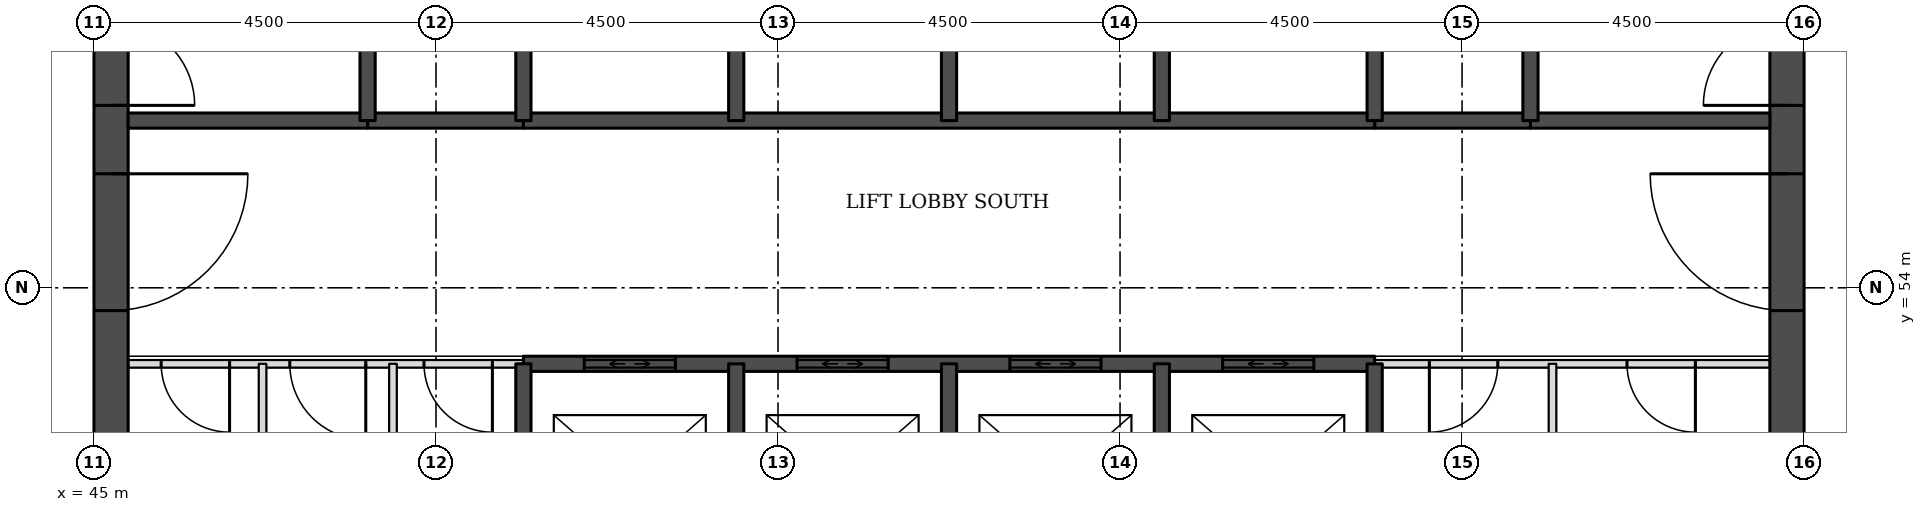
"""IFC4 building model, lengths in metres.
Left out: names, types, materials, properties, quantities, classifications, styles, units other than length and angle.
Written with IfcOpenShell. Run it as: python <this file> out.ifc"""

import sys

from ifc_helpers import new_model, si_unit, direction, frame, frame_2d, origin, place, context, subcontext, project, spatial, rectangle, extrude, element, fill, save


model = new_model("IFC4")
c1 = context("Model", 3, precision=1e-05, world=origin(), true_north=direction((0.0, 1.0)))
c2 = subcontext(c1, "Body", "Model", "MODEL_VIEW")
j1 = project(units=[si_unit("LENGTHUNIT", "METRE"), si_unit("PLANEANGLEUNIT", "RADIAN")], contexts=[c1])
p1 = place(None, origin())
s1 = spatial("IfcSite", under=j1, at=p1, CompositionType="ELEMENT")
p2 = place(p1, origin())
s2 = spatial("IfcBuilding", under=s1, at=p2, CompositionType="ELEMENT")
p3 = place(p2, frame((0.0, 0.0, 127.0)))
s3 = spatial("IfcBuildingStorey", under=s2, at=p3, CompositionType="ELEMENT", Elevation=127.0)
p4 = place(p3, frame((45.225, 49.5, 0.0), z_axis=(0.0, 0.0, 1.0), x_axis=(0.0, 1.0, 0.0)))
e1 = element("IfcWall", 1, at=p4, inside=s3, PredefinedType="SHEAR", context=c2, shape_type="SweptSolid", body=[
    extrude(rectangle(XDim=22.5, YDim=0.45, at=frame_2d((11.25, 0.0))), origin(), (0.0, 0.0, 1.0), 3.7),
])
p5 = place(p4, frame((4.2, 0.0, 0.0)))
e2 = element("IfcOpeningElement", 2, at=p5, cuts=e1, PredefinedType="OPENING", context=c2, shape_type="SweptSolid", body=[
    extrude(rectangle(XDim=1.8, YDim=2.1, at=frame_2d((0.9, 1.05))), frame((0.0, 0.235, 0.0), z_axis=(0.0, -1.0, 0.0), x_axis=(1.0, 0.0, 0.0)), (0.0, 0.0, 1.0), 0.47),
])
p6 = place(p4, frame((6.9, 0.0, 0.0)))
e3 = element("IfcOpeningElement", 3, at=p6, cuts=e1, PredefinedType="OPENING", context=c2, shape_type="SweptSolid", body=[
    extrude(rectangle(XDim=1.1, YDim=2.1, at=frame_2d((0.55, 1.05))), frame((0.0, 0.235, 0.0), z_axis=(0.0, -1.0, 0.0), x_axis=(1.0, 0.0, 0.0)), (0.0, 0.0, 1.0), 0.47),
])
p7 = place(p4, frame((13.6, 0.0, 0.0)))
e4 = element("IfcOpeningElement", 4, at=p7, cuts=e1, PredefinedType="OPENING", context=c2, shape_type="SweptSolid", body=[
    extrude(rectangle(XDim=1.1, YDim=2.1, at=frame_2d((0.55, 1.05))), frame((0.0, 0.235, 0.0), z_axis=(0.0, -1.0, 0.0), x_axis=(1.0, 0.0, 0.0)), (0.0, 0.0, 1.0), 0.47),
])
p8 = place(p4, frame((16.5, 0.0, 0.0)))
e5 = element("IfcOpeningElement", 5, at=p8, cuts=e1, PredefinedType="OPENING", context=c2, shape_type="SweptSolid", body=[
    extrude(rectangle(XDim=1.8, YDim=2.1, at=frame_2d((0.9, 1.05))), frame((0.0, 0.235, 0.0), z_axis=(0.0, -1.0, 0.0), x_axis=(1.0, 0.0, 0.0)), (0.0, 0.0, 1.0), 0.47),
])
p9 = place(p3, frame((67.275, 49.5, 0.0), z_axis=(0.0, 0.0, 1.0), x_axis=(0.0, 1.0, 0.0)))
e6 = element("IfcWall", 6, at=p9, inside=s3, PredefinedType="SHEAR", context=c2, shape_type="SweptSolid", body=[
    extrude(rectangle(XDim=22.5, YDim=0.45, at=frame_2d((11.25, 0.0))), origin(), (0.0, 0.0, 1.0), 3.7),
])
p10 = place(p9, frame((4.2, 0.0, 0.0)))
e7 = element("IfcOpeningElement", 7, at=p10, cuts=e6, PredefinedType="OPENING", context=c2, shape_type="SweptSolid", body=[
    extrude(rectangle(XDim=1.8, YDim=2.1, at=frame_2d((0.9, 1.05))), frame((0.0, 0.235, 0.0), z_axis=(0.0, -1.0, 0.0), x_axis=(1.0, 0.0, 0.0)), (0.0, 0.0, 1.0), 0.47),
])
p11 = place(p9, frame((6.9, 0.0, 0.0)))
e8 = element("IfcOpeningElement", 8, at=p11, cuts=e6, PredefinedType="OPENING", context=c2, shape_type="SweptSolid", body=[
    extrude(rectangle(XDim=1.1, YDim=2.1, at=frame_2d((0.55, 1.05))), frame((0.0, 0.235, 0.0), z_axis=(0.0, -1.0, 0.0), x_axis=(1.0, 0.0, 0.0)), (0.0, 0.0, 1.0), 0.47),
])
p12 = place(p9, frame((13.6, 0.0, 0.0)))
e9 = element("IfcOpeningElement", 9, at=p12, cuts=e6, PredefinedType="OPENING", context=c2, shape_type="SweptSolid", body=[
    extrude(rectangle(XDim=1.1, YDim=2.1, at=frame_2d((0.55, 1.05))), frame((0.0, 0.235, 0.0), z_axis=(0.0, -1.0, 0.0), x_axis=(1.0, 0.0, 0.0)), (0.0, 0.0, 1.0), 0.47),
])
p13 = place(p9, frame((16.5, 0.0, 0.0)))
e10 = element("IfcOpeningElement", 10, at=p13, cuts=e6, PredefinedType="OPENING", context=c2, shape_type="SweptSolid", body=[
    extrude(rectangle(XDim=1.8, YDim=2.1, at=frame_2d((0.9, 1.05))), frame((0.0, 0.235, 0.0), z_axis=(0.0, -1.0, 0.0), x_axis=(1.0, 0.0, 0.0)), (0.0, 0.0, 1.0), 0.47),
])
p14 = place(p3, frame((45.45, 53.0, 0.0), z_axis=(0.0, 0.0, 1.0), x_axis=(1.0, 0.0, 0.0)))
e11 = element("IfcWall", 11, at=p14, inside=s3, PredefinedType="PARTITIONING", context=c2, shape_type="SweptSolid", body=[
    extrude(rectangle(XDim=5.2, YDim=0.1, at=frame_2d((2.6, 0.0))), origin(), (0.0, 0.0, 1.0), 3.55),
])
p15 = place(p14, frame((0.434, 0.0, 0.0)))
e12 = element("IfcOpeningElement", 12, at=p15, cuts=e11, PredefinedType="OPENING", context=c2, shape_type="SweptSolid", body=[
    extrude(rectangle(XDim=0.9, YDim=2.1, at=frame_2d((0.45, 1.05))), frame((0.0, 0.06, 0.0), z_axis=(0.0, -1.0, 0.0), x_axis=(1.0, 0.0, 0.0)), (0.0, 0.0, 1.0), 0.12),
])
p16 = place(p14, frame((2.126, 0.0, 0.0)))
e13 = element("IfcOpeningElement", 13, at=p16, cuts=e11, PredefinedType="OPENING", context=c2, shape_type="SweptSolid", body=[
    extrude(rectangle(XDim=1.0, YDim=2.1, at=frame_2d((0.5, 1.05))), frame((0.0, 0.06, 0.0), z_axis=(0.0, -1.0, 0.0), x_axis=(1.0, 0.0, 0.0)), (0.0, 0.0, 1.0), 0.12),
])
p17 = place(p14, frame((3.892, 0.0, 0.0)))
e14 = element("IfcOpeningElement", 14, at=p17, cuts=e11, PredefinedType="OPENING", context=c2, shape_type="SweptSolid", body=[
    extrude(rectangle(XDim=0.9, YDim=2.1, at=frame_2d((0.45, 1.05))), frame((0.0, 0.06, 0.0), z_axis=(0.0, -1.0, 0.0), x_axis=(1.0, 0.0, 0.0)), (0.0, 0.0, 1.0), 0.12),
])
p18 = place(p3, frame((61.85, 53.0, 0.0), z_axis=(0.0, 0.0, 1.0), x_axis=(1.0, 0.0, 0.0)))
e15 = element("IfcWall", 15, at=p18, inside=s3, PredefinedType="PARTITIONING", context=c2, shape_type="SweptSolid", body=[
    extrude(rectangle(XDim=5.2, YDim=0.1, at=frame_2d((2.6, 0.0))), origin(), (0.0, 0.0, 1.0), 3.55),
])
p19 = place(p18, frame((3.32, 0.0, 0.0)))
e16 = element("IfcOpeningElement", 16, at=p19, cuts=e15, PredefinedType="OPENING", context=c2, shape_type="SweptSolid", body=[
    extrude(rectangle(XDim=0.9, YDim=2.1, at=frame_2d((0.45, 1.05))), frame((0.0, 0.06, 0.0), z_axis=(0.0, -1.0, 0.0), x_axis=(1.0, 0.0, 0.0)), (0.0, 0.0, 1.0), 0.12),
])
p20 = place(p18, frame((0.72, 0.0, 0.0)))
e17 = element("IfcOpeningElement", 17, at=p20, cuts=e15, PredefinedType="OPENING", context=c2, shape_type="SweptSolid", body=[
    extrude(rectangle(XDim=0.9, YDim=2.1, at=frame_2d((0.45, 1.05))), frame((0.0, 0.06, 0.0), z_axis=(0.0, -1.0, 0.0), x_axis=(1.0, 0.0, 0.0)), (0.0, 0.0, 1.0), 0.12),
])
p21 = place(p3, frame((50.65, 53.0, 0.0), z_axis=(0.0, 0.0, 1.0), x_axis=(1.0, 0.0, 0.0)))
e18 = element("IfcWall", 18, at=p21, inside=s3, PredefinedType="SOLIDWALL", context=c2, shape_type="SweptSolid", body=[
    extrude(rectangle(XDim=11.2, YDim=0.2, at=frame_2d((5.6, 0.0))), origin(), (0.0, 0.0, 1.0), 3.55),
])
p22 = place(p21, frame((0.8, 0.0, 0.0)))
e19 = element("IfcOpeningElement", 19, at=p22, cuts=e18, PredefinedType="OPENING", context=c2, shape_type="SweptSolid", body=[
    extrude(rectangle(XDim=1.2, YDim=2.1, at=frame_2d((0.6, 1.05))), frame((0.0, 0.11, 0.0), z_axis=(0.0, -1.0, 0.0), x_axis=(1.0, 0.0, 0.0)), (0.0, 0.0, 1.0), 0.22),
])
p23 = place(p21, frame((3.6, 0.0, 0.0)))
e20 = element("IfcOpeningElement", 20, at=p23, cuts=e18, PredefinedType="OPENING", context=c2, shape_type="SweptSolid", body=[
    extrude(rectangle(XDim=1.2, YDim=2.1, at=frame_2d((0.6, 1.05))), frame((0.0, 0.11, 0.0), z_axis=(0.0, -1.0, 0.0), x_axis=(1.0, 0.0, 0.0)), (0.0, 0.0, 1.0), 0.22),
])
p24 = place(p21, frame((6.4, 0.0, 0.0)))
e21 = element("IfcOpeningElement", 21, at=p24, cuts=e18, PredefinedType="OPENING", context=c2, shape_type="SweptSolid", body=[
    extrude(rectangle(XDim=1.2, YDim=2.1, at=frame_2d((0.6, 1.05))), frame((0.0, 0.11, 0.0), z_axis=(0.0, -1.0, 0.0), x_axis=(1.0, 0.0, 0.0)), (0.0, 0.0, 1.0), 0.22),
])
p25 = place(p21, frame((9.2, 0.0, 0.0)))
e22 = element("IfcOpeningElement", 22, at=p25, cuts=e18, PredefinedType="OPENING", context=c2, shape_type="SweptSolid", body=[
    extrude(rectangle(XDim=1.2, YDim=2.1, at=frame_2d((0.6, 1.05))), frame((0.0, 0.11, 0.0), z_axis=(0.0, -1.0, 0.0), x_axis=(1.0, 0.0, 0.0)), (0.0, 0.0, 1.0), 0.22),
])
for number, where, z_axis, x_axis in (
    (23, (48.6, 56.2, 0.0), (0.0, 0.0, 1.0), (1.0, 0.0, 0.0)),
    (24, (61.85, 56.2, 0.0), (0.0, 0.0, 1.0), (1.0, 0.0, 0.0)),
):
    element("IfcWall", number, at=place(p3, frame(where, z_axis=z_axis, x_axis=x_axis)), inside=s3, PredefinedType="SOLIDWALL", context=c2, shape_type="SweptSolid", body=[
        extrude(rectangle(XDim=2.05, YDim=0.2, at=frame_2d((1.025, 0.0))), origin(), (0.0, 0.0, 1.0), 3.55),
    ])
p26 = place(p3, frame((45.45, 56.2, 0.0), z_axis=(0.0, 0.0, 1.0), x_axis=(1.0, 0.0, 0.0)))
e25 = element("IfcWall", 25, at=p26, inside=s3, PredefinedType="SOLIDWALL", context=c2, shape_type="SweptSolid", body=[
    extrude(rectangle(XDim=3.15, YDim=0.2, at=frame_2d((1.575, 0.0))), origin(), (0.0, 0.0, 1.0), 3.55),
])
p27 = place(p3, frame((50.65, 56.2, 0.0), z_axis=(0.0, 0.0, 1.0), x_axis=(1.0, 0.0, 0.0)))
e26 = element("IfcWall", 26, at=p27, inside=s3, PredefinedType="SOLIDWALL", context=c2, shape_type="SweptSolid", body=[
    extrude(rectangle(XDim=11.2, YDim=0.2, at=frame_2d((5.6, 0.0))), origin(), (0.0, 0.0, 1.0), 3.55),
])
p28 = place(p3, frame((63.9, 56.2, 0.0), z_axis=(0.0, 0.0, 1.0), x_axis=(1.0, 0.0, 0.0)))
e27 = element("IfcWall", 27, at=p28, inside=s3, PredefinedType="SOLIDWALL", context=c2, shape_type="SweptSolid", body=[
    extrude(rectangle(XDim=3.15, YDim=0.2, at=frame_2d((1.575, 0.0))), origin(), (0.0, 0.0, 1.0), 3.55),
])
p29 = place(p3, frame((47.218, 49.95, 0.0), z_axis=(0.0, 0.0, 1.0), x_axis=(0.0, 1.0, 0.0)))
e28 = element("IfcWall", 28, at=p29, inside=s3, PredefinedType="PARTITIONING", context=c2, shape_type="SweptSolid", body=[
    extrude(rectangle(XDim=3.05, YDim=0.1, at=frame_2d((1.525, 0.0))), origin(), (0.0, 0.0, 1.0), 3.55),
])
p30 = place(p3, frame((48.6, 56.2, 0.0), z_axis=(0.0, 0.0, 1.0), x_axis=(0.0, 1.0, 0.0)))
e29 = element("IfcWall", 29, at=p30, inside=s3, PredefinedType="SOLIDWALL", context=c2, shape_type="SweptSolid", body=[
    extrude(rectangle(XDim=5.8, YDim=0.2, at=frame_2d((2.9, 0.0))), origin(), (0.0, 0.0, 1.0), 3.55),
])
p31 = place(p3, frame((48.934, 49.95, 0.0), z_axis=(0.0, 0.0, 1.0), x_axis=(0.0, 1.0, 0.0)))
e30 = element("IfcWall", 30, at=p31, inside=s3, PredefinedType="PARTITIONING", context=c2, shape_type="SweptSolid", body=[
    extrude(rectangle(XDim=3.05, YDim=0.1, at=frame_2d((1.525, 0.0))), origin(), (0.0, 0.0, 1.0), 3.55),
])
p32 = place(p3, frame((50.65, 49.95, 0.0), z_axis=(0.0, 0.0, 1.0), x_axis=(0.0, 1.0, 0.0)))
e31 = element("IfcWall", 31, at=p32, inside=s3, PredefinedType="SOLIDWALL", context=c2, shape_type="SweptSolid", body=[
    extrude(rectangle(XDim=3.05, YDim=0.2, at=frame_2d((1.525, 0.0))), origin(), (0.0, 0.0, 1.0), 3.55),
])
p33 = place(p3, frame((50.65, 56.2, 0.0), z_axis=(0.0, 0.0, 1.0), x_axis=(0.0, 1.0, 0.0)))
e32 = element("IfcWall", 32, at=p33, inside=s3, PredefinedType="SOLIDWALL", context=c2, shape_type="SweptSolid", body=[
    extrude(rectangle(XDim=2.8, YDim=0.2, at=frame_2d((1.4, 0.0))), origin(), (0.0, 0.0, 1.0), 3.55),
])
p34 = place(p3, frame((53.45, 49.95, 0.0), z_axis=(0.0, 0.0, 1.0), x_axis=(0.0, 1.0, 0.0)))
e33 = element("IfcWall", 33, at=p34, inside=s3, PredefinedType="SOLIDWALL", context=c2, shape_type="SweptSolid", body=[
    extrude(rectangle(XDim=3.05, YDim=0.2, at=frame_2d((1.525, 0.0))), origin(), (0.0, 0.0, 1.0), 3.55),
])
p35 = place(p3, frame((53.45, 56.2, 0.0), z_axis=(0.0, 0.0, 1.0), x_axis=(0.0, 1.0, 0.0)))
e34 = element("IfcWall", 34, at=p35, inside=s3, PredefinedType="SOLIDWALL", context=c2, shape_type="SweptSolid", body=[
    extrude(rectangle(XDim=2.8, YDim=0.2, at=frame_2d((1.4, 0.0))), origin(), (0.0, 0.0, 1.0), 3.55),
])
p36 = place(p3, frame((56.25, 49.95, 0.0), z_axis=(0.0, 0.0, 1.0), x_axis=(0.0, 1.0, 0.0)))
e35 = element("IfcWall", 35, at=p36, inside=s3, PredefinedType="SOLIDWALL", context=c2, shape_type="SweptSolid", body=[
    extrude(rectangle(XDim=3.05, YDim=0.2, at=frame_2d((1.525, 0.0))), origin(), (0.0, 0.0, 1.0), 3.55),
])
p37 = place(p3, frame((56.25, 56.2, 0.0), z_axis=(0.0, 0.0, 1.0), x_axis=(0.0, 1.0, 0.0)))
e36 = element("IfcWall", 36, at=p37, inside=s3, PredefinedType="SOLIDWALL", context=c2, shape_type="SweptSolid", body=[
    extrude(rectangle(XDim=2.8, YDim=0.2, at=frame_2d((1.4, 0.0))), origin(), (0.0, 0.0, 1.0), 3.55),
])
p38 = place(p3, frame((59.05, 49.95, 0.0), z_axis=(0.0, 0.0, 1.0), x_axis=(0.0, 1.0, 0.0)))
e37 = element("IfcWall", 37, at=p38, inside=s3, PredefinedType="SOLIDWALL", context=c2, shape_type="SweptSolid", body=[
    extrude(rectangle(XDim=3.05, YDim=0.2, at=frame_2d((1.525, 0.0))), origin(), (0.0, 0.0, 1.0), 3.55),
])
p39 = place(p3, frame((59.05, 56.2, 0.0), z_axis=(0.0, 0.0, 1.0), x_axis=(0.0, 1.0, 0.0)))
e38 = element("IfcWall", 38, at=p39, inside=s3, PredefinedType="SOLIDWALL", context=c2, shape_type="SweptSolid", body=[
    extrude(rectangle(XDim=2.8, YDim=0.2, at=frame_2d((1.4, 0.0))), origin(), (0.0, 0.0, 1.0), 3.55),
])
p40 = place(p3, frame((61.85, 49.95, 0.0), z_axis=(0.0, 0.0, 1.0), x_axis=(0.0, 1.0, 0.0)))
e39 = element("IfcWall", 39, at=p40, inside=s3, PredefinedType="SOLIDWALL", context=c2, shape_type="SweptSolid", body=[
    extrude(rectangle(XDim=3.05, YDim=0.2, at=frame_2d((1.525, 0.0))), origin(), (0.0, 0.0, 1.0), 3.55),
])
p41 = place(p3, frame((61.85, 56.2, 0.0), z_axis=(0.0, 0.0, 1.0), x_axis=(0.0, 1.0, 0.0)))
e40 = element("IfcWall", 40, at=p41, inside=s3, PredefinedType="SOLIDWALL", context=c2, shape_type="SweptSolid", body=[
    extrude(rectangle(XDim=2.8, YDim=0.2, at=frame_2d((1.4, 0.0))), origin(), (0.0, 0.0, 1.0), 3.55),
])
p42 = place(p3, frame((63.9, 56.2, 0.0), z_axis=(0.0, 0.0, 1.0), x_axis=(0.0, 1.0, 0.0)))
e41 = element("IfcWall", 41, at=p42, inside=s3, PredefinedType="SOLIDWALL", context=c2, shape_type="SweptSolid", body=[
    extrude(rectangle(XDim=5.8, YDim=0.2, at=frame_2d((2.9, 0.0))), origin(), (0.0, 0.0, 1.0), 3.55),
])
p43 = place(p3, frame((64.19, 49.95, 0.0), z_axis=(0.0, 0.0, 1.0), x_axis=(0.0, 1.0, 0.0)))
e42 = element("IfcWall", 42, at=p43, inside=s3, PredefinedType="PARTITIONING", context=c2, shape_type="SweptSolid", body=[
    extrude(rectangle(XDim=3.05, YDim=0.1, at=frame_2d((1.525, 0.0))), origin(), (0.0, 0.0, 1.0), 3.55),
])
p44 = place(p22, origin())
e43 = element("IfcDoor", 43, at=p44, inside=s3, OperationType="DOUBLE_DOOR_SLIDING", PredefinedType="DOOR", context=c2, shape_type="SweptSolid", body=[
    extrude(rectangle(XDim=1.2, YDim=2.1, at=frame_2d((0.6, 1.05))), frame((0.0, 0.025, 0.0), z_axis=(0.0, -1.0, 0.0), x_axis=(1.0, 0.0, 0.0)), (0.0, 0.0, 1.0), 0.05),
])
fill(e19, e43)
p45 = place(p23, origin())
e44 = element("IfcDoor", 44, at=p45, inside=s3, OperationType="DOUBLE_DOOR_SLIDING", PredefinedType="DOOR", context=c2, shape_type="SweptSolid", body=[
    extrude(rectangle(XDim=1.2, YDim=2.1, at=frame_2d((0.6, 1.05))), frame((0.0, 0.025, 0.0), z_axis=(0.0, -1.0, 0.0), x_axis=(1.0, 0.0, 0.0)), (0.0, 0.0, 1.0), 0.05),
])
fill(e20, e44)
p46 = place(p24, origin())
e45 = element("IfcDoor", 45, at=p46, inside=s3, OperationType="DOUBLE_DOOR_SLIDING", PredefinedType="DOOR", context=c2, shape_type="SweptSolid", body=[
    extrude(rectangle(XDim=1.2, YDim=2.1, at=frame_2d((0.6, 1.05))), frame((0.0, 0.025, 0.0), z_axis=(0.0, -1.0, 0.0), x_axis=(1.0, 0.0, 0.0)), (0.0, 0.0, 1.0), 0.05),
])
fill(e21, e45)
p47 = place(p25, origin())
e46 = element("IfcDoor", 46, at=p47, inside=s3, OperationType="DOUBLE_DOOR_SLIDING", PredefinedType="DOOR", context=c2, shape_type="SweptSolid", body=[
    extrude(rectangle(XDim=1.2, YDim=2.1, at=frame_2d((0.6, 1.05))), frame((0.0, 0.025, 0.0), z_axis=(0.0, -1.0, 0.0), x_axis=(1.0, 0.0, 0.0)), (0.0, 0.0, 1.0), 0.05),
])
fill(e22, e46)
p48 = place(p5, frame((1.8, 0.0, 0.0), z_axis=(0.0, 0.0, 1.0), x_axis=(-1.0, 0.0, 0.0)))
e47 = element("IfcDoor", 47, at=p48, inside=s3, OperationType="SINGLE_SWING_LEFT", PredefinedType="DOOR", context=c2, shape_type="SweptSolid", body=[
    extrude(rectangle(XDim=1.8, YDim=2.1, at=frame_2d((0.9, 1.05))), frame((0.0, 0.025, 0.0), z_axis=(0.0, -1.0, 0.0), x_axis=(1.0, 0.0, 0.0)), (0.0, 0.0, 1.0), 0.05),
])
fill(e2, e47)
p49 = place(p6, frame((1.1, 0.0, 0.0), z_axis=(0.0, 0.0, 1.0), x_axis=(-1.0, 0.0, 0.0)))
e48 = element("IfcDoor", 48, at=p49, inside=s3, OperationType="SINGLE_SWING_RIGHT", PredefinedType="DOOR", context=c2, shape_type="SweptSolid", body=[
    extrude(rectangle(XDim=1.1, YDim=2.1, at=frame_2d((0.55, 1.05))), frame((0.0, 0.025, 0.0), z_axis=(0.0, -1.0, 0.0), x_axis=(1.0, 0.0, 0.0)), (0.0, 0.0, 1.0), 0.05),
])
fill(e3, e48)
p50 = place(p10, origin())
e49 = element("IfcDoor", 49, at=p50, inside=s3, OperationType="SINGLE_SWING_RIGHT", PredefinedType="DOOR", context=c2, shape_type="SweptSolid", body=[
    extrude(rectangle(XDim=1.8, YDim=2.1, at=frame_2d((0.9, 1.05))), frame((0.0, 0.025, 0.0), z_axis=(0.0, -1.0, 0.0), x_axis=(1.0, 0.0, 0.0)), (0.0, 0.0, 1.0), 0.05),
])
fill(e7, e49)
p51 = place(p11, origin())
e50 = element("IfcDoor", 50, at=p51, inside=s3, OperationType="SINGLE_SWING_LEFT", PredefinedType="DOOR", context=c2, shape_type="SweptSolid", body=[
    extrude(rectangle(XDim=1.1, YDim=2.1, at=frame_2d((0.55, 1.05))), frame((0.0, 0.025, 0.0), z_axis=(0.0, -1.0, 0.0), x_axis=(1.0, 0.0, 0.0)), (0.0, 0.0, 1.0), 0.05),
])
fill(e8, e50)
p52 = place(p19, frame((0.9, 0.0, 0.0), z_axis=(0.0, 0.0, 1.0), x_axis=(-1.0, 0.0, 0.0)))
e51 = element("IfcDoor", 51, at=p52, inside=s3, OperationType="SINGLE_SWING_LEFT", PredefinedType="DOOR", context=c2, shape_type="SweptSolid", body=[
    extrude(rectangle(XDim=0.9, YDim=2.1, at=frame_2d((0.45, 1.05))), frame((0.0, 0.025, 0.0), z_axis=(0.0, -1.0, 0.0), x_axis=(1.0, 0.0, 0.0)), (0.0, 0.0, 1.0), 0.05),
])
fill(e16, e51)
p53 = place(p20, frame((0.9, 0.0, 0.0), z_axis=(0.0, 0.0, 1.0), x_axis=(-1.0, 0.0, 0.0)))
e52 = element("IfcDoor", 52, at=p53, inside=s3, OperationType="SINGLE_SWING_RIGHT", PredefinedType="DOOR", context=c2, shape_type="SweptSolid", body=[
    extrude(rectangle(XDim=0.9, YDim=2.1, at=frame_2d((0.45, 1.05))), frame((0.0, 0.025, 0.0), z_axis=(0.0, -1.0, 0.0), x_axis=(1.0, 0.0, 0.0)), (0.0, 0.0, 1.0), 0.05),
])
fill(e17, e52)
p54 = place(p15, frame((0.9, 0.0, 0.0), z_axis=(0.0, 0.0, 1.0), x_axis=(-1.0, 0.0, 0.0)))
e53 = element("IfcDoor", 53, at=p54, inside=s3, OperationType="SINGLE_SWING_LEFT", PredefinedType="DOOR", context=c2, shape_type="SweptSolid", body=[
    extrude(rectangle(XDim=0.9, YDim=2.1, at=frame_2d((0.45, 1.05))), frame((0.0, 0.025, 0.0), z_axis=(0.0, -1.0, 0.0), x_axis=(1.0, 0.0, 0.0)), (0.0, 0.0, 1.0), 0.05),
])
fill(e12, e53)
p55 = place(p16, frame((1.0, 0.0, 0.0), z_axis=(0.0, 0.0, 1.0), x_axis=(-1.0, 0.0, 0.0)))
e54 = element("IfcDoor", 54, at=p55, inside=s3, OperationType="SINGLE_SWING_LEFT", PredefinedType="DOOR", context=c2, shape_type="SweptSolid", body=[
    extrude(rectangle(XDim=1.0, YDim=2.1, at=frame_2d((0.5, 1.05))), frame((0.0, 0.025, 0.0), z_axis=(0.0, -1.0, 0.0), x_axis=(1.0, 0.0, 0.0)), (0.0, 0.0, 1.0), 0.05),
])
fill(e13, e54)
p56 = place(p17, frame((0.9, 0.0, 0.0), z_axis=(0.0, 0.0, 1.0), x_axis=(-1.0, 0.0, 0.0)))
e55 = element("IfcDoor", 55, at=p56, inside=s3, OperationType="SINGLE_SWING_LEFT", PredefinedType="DOOR", context=c2, shape_type="SweptSolid", body=[
    extrude(rectangle(XDim=0.9, YDim=2.1, at=frame_2d((0.45, 1.05))), frame((0.0, 0.025, 0.0), z_axis=(0.0, -1.0, 0.0), x_axis=(1.0, 0.0, 0.0)), (0.0, 0.0, 1.0), 0.05),
])
fill(e14, e55)
save(model, sys.argv[1])
